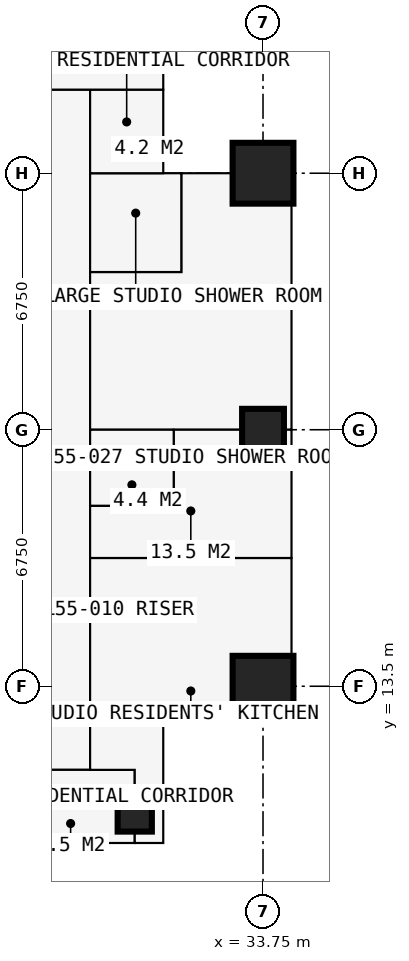
"""IFC4 building model, lengths in metres.
Left out: names, types, materials, properties, quantities, classifications, styles, units other than length and angle.
Written with IfcOpenShell. Run it as: python <this file> out.ifc"""

import sys

from ifc_helpers import new_model, si_unit, direction, frame, frame_2d, origin, origin_2d, place, context, subcontext, project, spatial, rectangle, extrude, element, fill, save


model = new_model("IFC4")
c1 = context("Model", 3, precision=1e-05, world=origin(), true_north=direction((0.0, 1.0)))
c2 = subcontext(c1, "Body", "Model", "MODEL_VIEW")
j1 = project(units=[si_unit("LENGTHUNIT", "METRE"), si_unit("PLANEANGLEUNIT", "RADIAN")], contexts=[c1])
p1 = place(None, origin())
s1 = spatial("IfcSite", under=j1, at=p1, CompositionType="ELEMENT")
p2 = place(p1, origin())
s2 = spatial("IfcBuilding", under=s1, at=p2, CompositionType="ELEMENT")
p3 = place(p2, frame((0.0, 0.0, 204.3)))
s3 = spatial("IfcBuildingStorey", under=s2, at=p3, CompositionType="ELEMENT", Elevation=204.3)
for number, where, z_axis, x_axis in (
    (1, (30.375, 10.125, 0.0), (0.0, 0.0, 1.0), (1.0, 0.0, 0.0)),
    (2, (30.375, 30.375, 0.0), (0.0, 0.0, 1.0), (1.0, 0.0, 0.0)),
):
    element("IfcColumn", number, at=place(p3, frame(where, z_axis=z_axis, x_axis=x_axis)), inside=s3, PredefinedType="COLUMN", context=c2, shape_type="SweptSolid", body=[
        extrude(rectangle(XDim=0.9, YDim=0.9, at=origin_2d()), origin(), (0.0, 0.0, 1.0), 3.6),
    ])
p4 = place(p3, frame((33.75, 13.5, 0.0), z_axis=(0.0, 0.0, 1.0), x_axis=(1.0, 0.0, 0.0)))
e3 = element("IfcColumn", 3, at=p4, inside=s3, PredefinedType="COLUMN", context=c2, shape_type="SweptSolid", body=[
    extrude(rectangle(XDim=1.6, YDim=1.6, at=origin_2d()), origin(), (0.0, 0.0, 1.0), 3.6),
])
p5 = place(p3, frame((33.75, 20.25, 0.0), z_axis=(0.0, 0.0, 1.0), x_axis=(1.0, 0.0, 0.0)))
e4 = element("IfcColumn", 4, at=p5, inside=s3, PredefinedType="COLUMN", context=c2, shape_type="SweptSolid", body=[
    extrude(rectangle(XDim=1.1, YDim=1.1, at=origin_2d()), origin(), (0.0, 0.0, 1.0), 3.6),
])
p6 = place(p3, frame((33.75, 27.0, 0.0), z_axis=(0.0, 0.0, 1.0), x_axis=(1.0, 0.0, 0.0)))
e5 = element("IfcColumn", 5, at=p6, inside=s3, PredefinedType="COLUMN", context=c2, shape_type="SweptSolid", body=[
    extrude(rectangle(XDim=1.6, YDim=1.6, at=origin_2d()), origin(), (0.0, 0.0, 1.0), 3.6),
])
p7 = place(p3, frame((34.5, 27.75, 0.0), z_axis=(0.0, 0.0, 1.0), x_axis=(-1.0, 0.0, 0.0)))
e6 = element("IfcWall", 6, at=p7, inside=s3, PredefinedType="SOLIDWALL", context=c2, shape_type="SweptSolid", body=[
    extrude(rectangle(XDim=3.375, YDim=0.3, at=frame_2d((1.688, 0.0))), origin(), (0.0, 0.0, 1.0), 3.375),
])
p8 = place(p7, frame((1.633, 0.0, 0.9)))
e7 = element("IfcOpeningElement", 7, at=p8, cuts=e6, PredefinedType="OPENING", context=c2, shape_type="SweptSolid", body=[
    extrude(rectangle(XDim=1.5, YDim=1.8, at=frame_2d((0.75, 0.9))), frame((0.0, 0.16, 0.0), z_axis=(0.0, -1.0, 0.0), x_axis=(1.0, 0.0, 0.0)), (0.0, 0.0, 1.0), 0.32),
])
p9 = place(p3, frame((31.125, 27.75, 0.0), z_axis=(0.0, 0.0, 1.0), x_axis=(0.0, 1.0, 0.0)))
e8 = element("IfcWall", 8, at=p9, inside=s3, PredefinedType="SOLIDWALL", context=c2, shape_type="SweptSolid", body=[
    extrude(rectangle(XDim=3.375, YDim=0.3, at=frame_2d((1.688, 0.0))), origin(), (0.0, 0.0, 1.0), 3.375),
])
p10 = place(p9, frame((1.663, 0.0, 0.9)))
e9 = element("IfcOpeningElement", 9, at=p10, cuts=e8, PredefinedType="OPENING", context=c2, shape_type="SweptSolid", body=[
    extrude(rectangle(XDim=1.5, YDim=1.8, at=frame_2d((0.75, 0.9))), frame((0.0, 0.16, 0.0), z_axis=(0.0, -1.0, 0.0), x_axis=(1.0, 0.0, 0.0)), (0.0, 0.0, 1.0), 0.32),
])
p11 = place(p3, frame((27.75, 9.375, 0.0), z_axis=(0.0, 0.0, 1.0), x_axis=(1.0, 0.0, 0.0)))
e10 = element("IfcWall", 10, at=p11, inside=s3, PredefinedType="SOLIDWALL", context=c2, shape_type="SweptSolid", body=[
    extrude(rectangle(XDim=3.375, YDim=0.3, at=frame_2d((1.688, 0.0))), origin(), (0.0, 0.0, 1.0), 3.375),
])
p12 = place(p11, frame((0.788, 0.0, 0.6)))
e11 = element("IfcOpeningElement", 11, at=p12, cuts=e10, PredefinedType="OPENING", context=c2, shape_type="SweptSolid", body=[
    extrude(rectangle(XDim=1.8, YDim=2.1, at=frame_2d((0.9, 1.05))), frame((0.0, 0.16, 0.0), z_axis=(0.0, -1.0, 0.0), x_axis=(1.0, 0.0, 0.0)), (0.0, 0.0, 1.0), 0.32),
])
p13 = place(p3, frame((31.125, 9.375, 0.0), z_axis=(0.0, 0.0, 1.0), x_axis=(0.0, 1.0, 0.0)))
e12 = element("IfcWall", 12, at=p13, inside=s3, PredefinedType="SOLIDWALL", context=c2, shape_type="SweptSolid", body=[
    extrude(rectangle(XDim=3.375, YDim=0.3, at=frame_2d((1.688, 0.0))), origin(), (0.0, 0.0, 1.0), 3.375),
])
p14 = place(p13, frame((0.788, 0.0, 0.6)))
e13 = element("IfcOpeningElement", 13, at=p14, cuts=e12, PredefinedType="OPENING", context=c2, shape_type="SweptSolid", body=[
    extrude(rectangle(XDim=1.8, YDim=2.1, at=frame_2d((0.9, 1.05))), frame((0.0, 0.16, 0.0), z_axis=(0.0, -1.0, 0.0), x_axis=(1.0, 0.0, 0.0)), (0.0, 0.0, 1.0), 0.32),
])
p15 = place(p3, frame((31.125, 12.75, 0.0), z_axis=(0.0, 0.0, 1.0), x_axis=(1.0, 0.0, 0.0)))
e14 = element("IfcWall", 14, at=p15, inside=s3, PredefinedType="SOLIDWALL", context=c2, shape_type="SweptSolid", body=[
    extrude(rectangle(XDim=3.375, YDim=0.3, at=frame_2d((1.688, 0.0))), origin(), (0.0, 0.0, 1.0), 3.375),
])
p16 = place(p15, frame((0.242, 0.0, 0.9)))
e15 = element("IfcOpeningElement", 15, at=p16, cuts=e14, PredefinedType="OPENING", context=c2, shape_type="SweptSolid", body=[
    extrude(rectangle(XDim=1.5, YDim=1.8, at=frame_2d((0.75, 0.9))), frame((0.0, 0.16, 0.0), z_axis=(0.0, -1.0, 0.0), x_axis=(1.0, 0.0, 0.0)), (0.0, 0.0, 1.0), 0.32),
])
p17 = place(p3, frame((32.6, 11.15, -0.06), z_axis=(0.0, 0.0, 1.0), x_axis=(0.0, -1.0, 0.0)))
e16 = element("IfcWall", 16, at=p17, inside=s3, PredefinedType="USERDEFINED", context=c2, shape_type="SweptSolid", body=[
    extrude(rectangle(XDim=3.75, YDim=0.8, at=frame_2d((1.875, 0.0))), origin(), (0.0, 0.0, 1.0), 0.66),
])
p18 = place(p3, frame((10.125, 11.3, 0.0), z_axis=(0.0, 0.0, 1.0), x_axis=(1.0, 0.0, 0.0)))
e17 = element("IfcWall", 17, at=p18, inside=s3, PredefinedType="PARTITIONING", context=c2, shape_type="SweptSolid", body=[
    extrude(rectangle(XDim=20.25, YDim=0.15, at=frame_2d((10.125, 0.0))), origin(), (0.0, 0.0, 1.0), 3.375),
])
p19 = place(p18, frame((11.725, 0.0, 0.0)))
e18 = element("IfcOpeningElement", 18, at=p19, cuts=e17, PredefinedType="OPENING", context=c2, shape_type="SweptSolid", body=[
    extrude(rectangle(XDim=0.95, YDim=2.2, at=frame_2d((0.475, 1.1))), frame((0.0, 0.085, 0.0), z_axis=(0.0, -1.0, 0.0), x_axis=(1.0, 0.0, 0.0)), (0.0, 0.0, 1.0), 0.17),
])
p20 = place(p18, frame((17.475, 0.0, 0.0)))
e19 = element("IfcOpeningElement", 19, at=p20, cuts=e17, PredefinedType="OPENING", context=c2, shape_type="SweptSolid", body=[
    extrude(rectangle(XDim=1.0, YDim=2.2, at=frame_2d((0.5, 1.1))), frame((0.0, 0.085, 0.0), z_axis=(0.0, -1.0, 0.0), x_axis=(1.0, 0.0, 0.0)), (0.0, 0.0, 1.0), 0.17),
])
p21 = place(p18, frame((7.95, 0.0, 0.0)))
e20 = element("IfcOpeningElement", 20, at=p21, cuts=e17, PredefinedType="OPENING", context=c2, shape_type="SweptSolid", body=[
    extrude(rectangle(XDim=0.95, YDim=2.2, at=frame_2d((0.475, 1.1))), frame((0.0, 0.085, 0.0), z_axis=(0.0, -1.0, 0.0), x_axis=(1.0, 0.0, 0.0)), (0.0, 0.0, 1.0), 0.17),
])
p22 = place(p3, frame((11.3, 29.2, 0.0), z_axis=(0.0, 0.0, 1.0), x_axis=(1.0, 0.0, 0.0)))
e21 = element("IfcWall", 21, at=p22, inside=s3, PredefinedType="PARTITIONING", context=c2, shape_type="SweptSolid", body=[
    extrude(rectangle(XDim=19.809, YDim=0.1, at=frame_2d((9.904, 0.0))), origin(), (0.0, 0.0, 1.0), 3.375),
])
p23 = place(p22, frame((16.3, 0.0, 0.0)))
e22 = element("IfcOpeningElement", 22, at=p23, cuts=e21, PredefinedType="OPENING", context=c2, shape_type="SweptSolid", body=[
    extrude(rectangle(XDim=1.0, YDim=2.2, at=frame_2d((0.5, 1.1))), frame((0.0, 0.06, 0.0), z_axis=(0.0, -1.0, 0.0), x_axis=(1.0, 0.0, 0.0)), (0.0, 0.0, 1.0), 0.12),
])
p24 = place(p22, frame((6.4, 0.0, 0.0)))
e23 = element("IfcOpeningElement", 23, at=p24, cuts=e21, PredefinedType="OPENING", context=c2, shape_type="SweptSolid", body=[
    extrude(rectangle(XDim=0.95, YDim=2.2, at=frame_2d((0.475, 1.1))), frame((0.0, 0.06, 0.0), z_axis=(0.0, -1.0, 0.0), x_axis=(1.0, 0.0, 0.0)), (0.0, 0.0, 1.0), 0.12),
])
p25 = place(p22, frame((13.15, 0.0, 0.0)))
e24 = element("IfcOpeningElement", 24, at=p25, cuts=e21, PredefinedType="OPENING", context=c2, shape_type="SweptSolid", body=[
    extrude(rectangle(XDim=0.95, YDim=2.2, at=frame_2d((0.475, 1.1))), frame((0.0, 0.06, 0.0), z_axis=(0.0, -1.0, 0.0), x_axis=(1.0, 0.0, 0.0)), (0.0, 0.0, 1.0), 0.12),
])
p26 = place(p22, frame((0.6, 0.0, 0.0)))
e25 = element("IfcOpeningElement", 25, at=p26, cuts=e21, PredefinedType="OPENING", context=c2, shape_type="SweptSolid", body=[
    extrude(rectangle(XDim=1.0, YDim=2.2, at=frame_2d((0.5, 1.1))), frame((0.0, 0.06, 0.0), z_axis=(0.0, -1.0, 0.0), x_axis=(1.0, 0.0, 0.0)), (0.0, 0.0, 1.0), 0.12),
])
p27 = place(p3, frame((29.2, 11.3, 0.0), z_axis=(0.0, 0.0, 1.0), x_axis=(0.0, 1.0, 0.0)))
e26 = element("IfcWall", 26, at=p27, inside=s3, PredefinedType="PARTITIONING", context=c2, shape_type="SweptSolid", body=[
    extrude(rectangle(XDim=17.9, YDim=0.2, at=frame_2d((8.95, 0.0))), origin(), (0.0, 0.0, 1.0), 3.375),
])
p28 = place(p27, frame((2.3, 0.0, 0.0)))
e27 = element("IfcOpeningElement", 27, at=p28, cuts=e26, PredefinedType="OPENING", context=c2, shape_type="SweptSolid", body=[
    extrude(rectangle(XDim=1.0, YDim=2.2, at=frame_2d((0.5, 1.1))), frame((0.0, 0.11, 0.0), z_axis=(0.0, -1.0, 0.0), x_axis=(1.0, 0.0, 0.0)), (0.0, 0.0, 1.0), 0.22),
])
p29 = place(p27, frame((10.55, 0.0, 0.0)))
e28 = element("IfcOpeningElement", 28, at=p29, cuts=e26, PredefinedType="OPENING", context=c2, shape_type="SweptSolid", body=[
    extrude(rectangle(XDim=0.95, YDim=2.2, at=frame_2d((0.475, 1.1))), frame((0.0, 0.11, 0.0), z_axis=(0.0, -1.0, 0.0), x_axis=(1.0, 0.0, 0.0)), (0.0, 0.0, 1.0), 0.22),
])
p30 = place(p27, frame((5.775, 0.0, 0.0)))
e29 = element("IfcOpeningElement", 29, at=p30, cuts=e26, PredefinedType="OPENING", context=c2, shape_type="SweptSolid", body=[
    extrude(rectangle(XDim=0.95, YDim=2.2, at=frame_2d((0.475, 1.1))), frame((0.0, 0.11, 0.0), z_axis=(0.0, -1.0, 0.0), x_axis=(1.0, 0.0, 0.0)), (0.0, 0.0, 1.0), 0.22),
])
p31 = place(p27, frame((16.3, 0.0, 0.0)))
e30 = element("IfcOpeningElement", 30, at=p31, cuts=e26, PredefinedType="OPENING", context=c2, shape_type="SweptSolid", body=[
    extrude(rectangle(XDim=1.0, YDim=2.2, at=frame_2d((0.5, 1.1))), frame((0.0, 0.11, 0.0), z_axis=(0.0, -1.0, 0.0), x_axis=(1.0, 0.0, 0.0)), (0.0, 0.0, 1.0), 0.22),
])
p32 = place(p3, frame((29.2, 16.875, 0.0), z_axis=(0.0, 0.0, 1.0), x_axis=(1.0, 0.0, 0.0)))
e31 = element("IfcWall", 31, at=p32, inside=s3, PredefinedType="PARTITIONING", context=c2, shape_type="SweptSolid", body=[
    extrude(rectangle(XDim=5.284, YDim=0.15, at=frame_2d((2.642, 0.0))), origin(), (0.0, 0.0, 1.0), 3.375),
])
p33 = place(p3, frame((29.2, 18.25, 0.0), z_axis=(0.0, 0.0, 1.0), x_axis=(1.0, 0.0, 0.0)))
e32 = element("IfcWall", 32, at=p33, inside=s3, PredefinedType="PARTITIONING", context=c2, shape_type="SweptSolid", body=[
    extrude(rectangle(XDim=2.2, YDim=0.1, at=frame_2d((1.1, 0.0))), origin(), (0.0, 0.0, 1.0), 3.375),
])
p34 = place(p3, frame((29.2, 20.25, 0.0), z_axis=(0.0, 0.0, 1.0), x_axis=(1.0, 0.0, 0.0)))
e33 = element("IfcWall", 33, at=p34, inside=s3, PredefinedType="PARTITIONING", context=c2, shape_type="SweptSolid", body=[
    extrude(rectangle(XDim=5.284, YDim=0.175, at=frame_2d((2.642, 0.0))), origin(), (0.0, 0.0, 1.0), 2.806),
])
p35 = place(p34, frame((0.65, 0.0, 0.0)))
e34 = element("IfcOpeningElement", 34, at=p35, cuts=e33, PredefinedType="OPENING", context=c2, shape_type="SweptSolid", body=[
    extrude(rectangle(XDim=0.9, YDim=2.2, at=frame_2d((0.45, 1.1))), frame((0.0, 0.097, 0.0), z_axis=(0.0, -1.0, 0.0), x_axis=(1.0, 0.0, 0.0)), (0.0, 0.0, 1.0), 0.195),
])
p36 = place(p3, frame((29.2, 24.4, 0.0), z_axis=(0.0, 0.0, 1.0), x_axis=(1.0, 0.0, 0.0)))
e35 = element("IfcWall", 35, at=p36, inside=s3, PredefinedType="PARTITIONING", context=c2, shape_type="SweptSolid", body=[
    extrude(rectangle(XDim=2.4, YDim=0.1, at=frame_2d((1.2, 0.0))), origin(), (0.0, 0.0, 1.0), 3.375),
])
p37 = place(p3, frame((29.2, 27.0, 0.0), z_axis=(0.0, 0.0, 1.0), x_axis=(1.0, 0.0, 0.0)))
e36 = element("IfcWall", 36, at=p37, inside=s3, PredefinedType="PARTITIONING", context=c2, shape_type="SweptSolid", body=[
    extrude(rectangle(XDim=5.284, YDim=0.175, at=frame_2d((2.642, 0.0))), origin(), (0.0, 0.0, 1.0), 2.806),
])
p38 = place(p3, frame((30.375, 9.525, 0.0), z_axis=(0.0, 0.0, 1.0), x_axis=(0.0, 1.0, 0.0)))
e37 = element("IfcWall", 37, at=p38, inside=s3, PredefinedType="PARTITIONING", context=c2, shape_type="SweptSolid", body=[
    extrude(rectangle(XDim=1.775, YDim=0.15, at=frame_2d((0.888, 0.0))), origin(), (0.0, 0.0, 1.0), 2.877),
])
p39 = place(p3, frame((31.125, 27.0, 0.0), z_axis=(0.0, 0.0, 1.0), x_axis=(0.0, 1.0, 0.0)))
e38 = element("IfcWall", 38, at=p39, inside=s3, PredefinedType="PARTITIONING", context=c2, shape_type="SweptSolid", body=[
    extrude(rectangle(XDim=0.734, YDim=0.15, at=frame_2d((0.367, 0.0))), origin(), (0.0, 0.0, 1.0), 3.375),
])
p40 = place(p3, frame((31.4, 18.25, 0.0), z_axis=(0.0, 0.0, 1.0), x_axis=(0.0, 1.0, 0.0)))
e39 = element("IfcWall", 39, at=p40, inside=s3, PredefinedType="PARTITIONING", context=c2, shape_type="SweptSolid", body=[
    extrude(rectangle(XDim=2.0, YDim=0.1, at=frame_2d((1.0, 0.0))), origin(), (0.0, 0.0, 1.0), 3.375),
])
p41 = place(p3, frame((31.6, 24.4, 0.0), z_axis=(0.0, 0.0, 1.0), x_axis=(0.0, 1.0, 0.0)))
e40 = element("IfcWall", 40, at=p41, inside=s3, PredefinedType="PARTITIONING", context=c2, shape_type="SweptSolid", body=[
    extrude(rectangle(XDim=2.6, YDim=0.1, at=frame_2d((1.3, 0.0))), origin(), (0.0, 0.0, 1.0), 3.375),
])
p42 = place(p41, frame((0.85, 0.0, 0.0)))
e41 = element("IfcOpeningElement", 41, at=p42, cuts=e40, PredefinedType="OPENING", context=c2, shape_type="SweptSolid", body=[
    extrude(rectangle(XDim=0.9, YDim=2.2, at=frame_2d((0.45, 1.1))), frame((0.0, 0.06, 0.0), z_axis=(0.0, -1.0, 0.0), x_axis=(1.0, 0.0, 0.0)), (0.0, 0.0, 1.0), 0.12),
])
p43 = place(p8, origin())
e42 = element("IfcWindow", 42, at=p43, inside=s3, PartitioningType="SINGLE_PANEL", PredefinedType="WINDOW", context=c2, shape_type="SweptSolid", body=[
    extrude(rectangle(XDim=1.5, YDim=1.8, at=frame_2d((0.75, 0.9))), frame((0.0, 0.03, 0.0), z_axis=(0.0, -1.0, 0.0), x_axis=(1.0, 0.0, 0.0)), (0.0, 0.0, 1.0), 0.06),
])
fill(e7, e42)
p44 = place(p10, origin())
e43 = element("IfcWindow", 43, at=p44, inside=s3, PartitioningType="SINGLE_PANEL", PredefinedType="WINDOW", context=c2, shape_type="SweptSolid", body=[
    extrude(rectangle(XDim=1.5, YDim=1.8, at=frame_2d((0.75, 0.9))), frame((0.0, 0.03, 0.0), z_axis=(0.0, -1.0, 0.0), x_axis=(1.0, 0.0, 0.0)), (0.0, 0.0, 1.0), 0.06),
])
fill(e9, e43)
p45 = place(p12, origin())
e44 = element("IfcWindow", 44, at=p45, inside=s3, PartitioningType="SINGLE_PANEL", PredefinedType="WINDOW", context=c2, shape_type="SweptSolid", body=[
    extrude(rectangle(XDim=1.8, YDim=2.1, at=frame_2d((0.9, 1.05))), frame((0.0, 0.03, 0.0), z_axis=(0.0, -1.0, 0.0), x_axis=(1.0, 0.0, 0.0)), (0.0, 0.0, 1.0), 0.06),
])
fill(e11, e44)
p46 = place(p14, origin())
e45 = element("IfcWindow", 45, at=p46, inside=s3, PartitioningType="SINGLE_PANEL", PredefinedType="WINDOW", context=c2, shape_type="SweptSolid", body=[
    extrude(rectangle(XDim=1.8, YDim=2.1, at=frame_2d((0.9, 1.05))), frame((0.0, 0.03, 0.0), z_axis=(0.0, -1.0, 0.0), x_axis=(1.0, 0.0, 0.0)), (0.0, 0.0, 1.0), 0.06),
])
fill(e13, e45)
p47 = place(p16, origin())
e46 = element("IfcWindow", 46, at=p47, inside=s3, PartitioningType="SINGLE_PANEL", PredefinedType="WINDOW", context=c2, shape_type="SweptSolid", body=[
    extrude(rectangle(XDim=1.5, YDim=1.8, at=frame_2d((0.75, 0.9))), frame((0.0, 0.03, 0.0), z_axis=(0.0, -1.0, 0.0), x_axis=(1.0, 0.0, 0.0)), (0.0, 0.0, 1.0), 0.06),
])
fill(e15, e46)
p48 = place(p20, origin())
e47 = element("IfcDoor", 47, at=p48, inside=s3, OperationType="SINGLE_SWING_LEFT", PredefinedType="DOOR", context=c2, shape_type="SweptSolid", body=[
    extrude(rectangle(XDim=1.0, YDim=2.2, at=frame_2d((0.5, 1.1))), frame((0.0, 0.025, 0.0), z_axis=(0.0, -1.0, 0.0), x_axis=(1.0, 0.0, 0.0)), (0.0, 0.0, 1.0), 0.05),
])
fill(e19, e47)
p49 = place(p28, origin())
e48 = element("IfcDoor", 48, at=p49, inside=s3, OperationType="SINGLE_SWING_LEFT", PredefinedType="DOOR", context=c2, shape_type="SweptSolid", body=[
    extrude(rectangle(XDim=1.0, YDim=2.2, at=frame_2d((0.5, 1.1))), frame((0.0, 0.025, 0.0), z_axis=(0.0, -1.0, 0.0), x_axis=(1.0, 0.0, 0.0)), (0.0, 0.0, 1.0), 0.05),
])
fill(e27, e48)
p50 = place(p29, origin())
e49 = element("IfcDoor", 49, at=p50, inside=s3, OperationType="SINGLE_SWING_LEFT", PredefinedType="DOOR", context=c2, shape_type="SweptSolid", body=[
    extrude(rectangle(XDim=0.95, YDim=2.2, at=frame_2d((0.475, 1.1))), frame((0.0, 0.025, 0.0), z_axis=(0.0, -1.0, 0.0), x_axis=(1.0, 0.0, 0.0)), (0.0, 0.0, 1.0), 0.05),
])
fill(e28, e49)
p51 = place(p42, origin())
e50 = element("IfcDoor", 50, at=p51, inside=s3, OperationType="SINGLE_SWING_RIGHT", PredefinedType="DOOR", context=c2, shape_type="SweptSolid", body=[
    extrude(rectangle(XDim=0.9, YDim=2.2, at=frame_2d((0.45, 1.1))), frame((0.0, 0.025, 0.0), z_axis=(0.0, -1.0, 0.0), x_axis=(1.0, 0.0, 0.0)), (0.0, 0.0, 1.0), 0.05),
])
fill(e41, e50)
p52 = place(p30, origin())
e51 = element("IfcDoor", 51, at=p52, inside=s3, OperationType="SINGLE_SWING_LEFT", PredefinedType="DOOR", context=c2, shape_type="SweptSolid", body=[
    extrude(rectangle(XDim=0.95, YDim=2.2, at=frame_2d((0.475, 1.1))), frame((0.0, 0.025, 0.0), z_axis=(0.0, -1.0, 0.0), x_axis=(1.0, 0.0, 0.0)), (0.0, 0.0, 1.0), 0.05),
])
fill(e29, e51)
p53 = place(p35, origin())
e52 = element("IfcDoor", 52, at=p53, inside=s3, OperationType="SINGLE_SWING_RIGHT", PredefinedType="DOOR", context=c2, shape_type="SweptSolid", body=[
    extrude(rectangle(XDim=0.9, YDim=2.2, at=frame_2d((0.45, 1.1))), frame((0.0, 0.025, 0.0), z_axis=(0.0, -1.0, 0.0), x_axis=(1.0, 0.0, 0.0)), (0.0, 0.0, 1.0), 0.05),
])
fill(e34, e52)
p54 = place(p31, origin())
e53 = element("IfcDoor", 53, at=p54, inside=s3, OperationType="SINGLE_SWING_LEFT", PredefinedType="DOOR", context=c2, shape_type="SweptSolid", body=[
    extrude(rectangle(XDim=1.0, YDim=2.2, at=frame_2d((0.5, 1.1))), frame((0.0, 0.025, 0.0), z_axis=(0.0, -1.0, 0.0), x_axis=(1.0, 0.0, 0.0)), (0.0, 0.0, 1.0), 0.05),
])
fill(e30, e53)
p55 = place(p23, origin())
e54 = element("IfcDoor", 54, at=p55, inside=s3, OperationType="SINGLE_SWING_LEFT", PredefinedType="DOOR", context=c2, shape_type="SweptSolid", body=[
    extrude(rectangle(XDim=1.0, YDim=2.2, at=frame_2d((0.5, 1.1))), frame((0.0, 0.025, 0.0), z_axis=(0.0, -1.0, 0.0), x_axis=(1.0, 0.0, 0.0)), (0.0, 0.0, 1.0), 0.05),
])
fill(e22, e54)
save(model, sys.argv[1])
